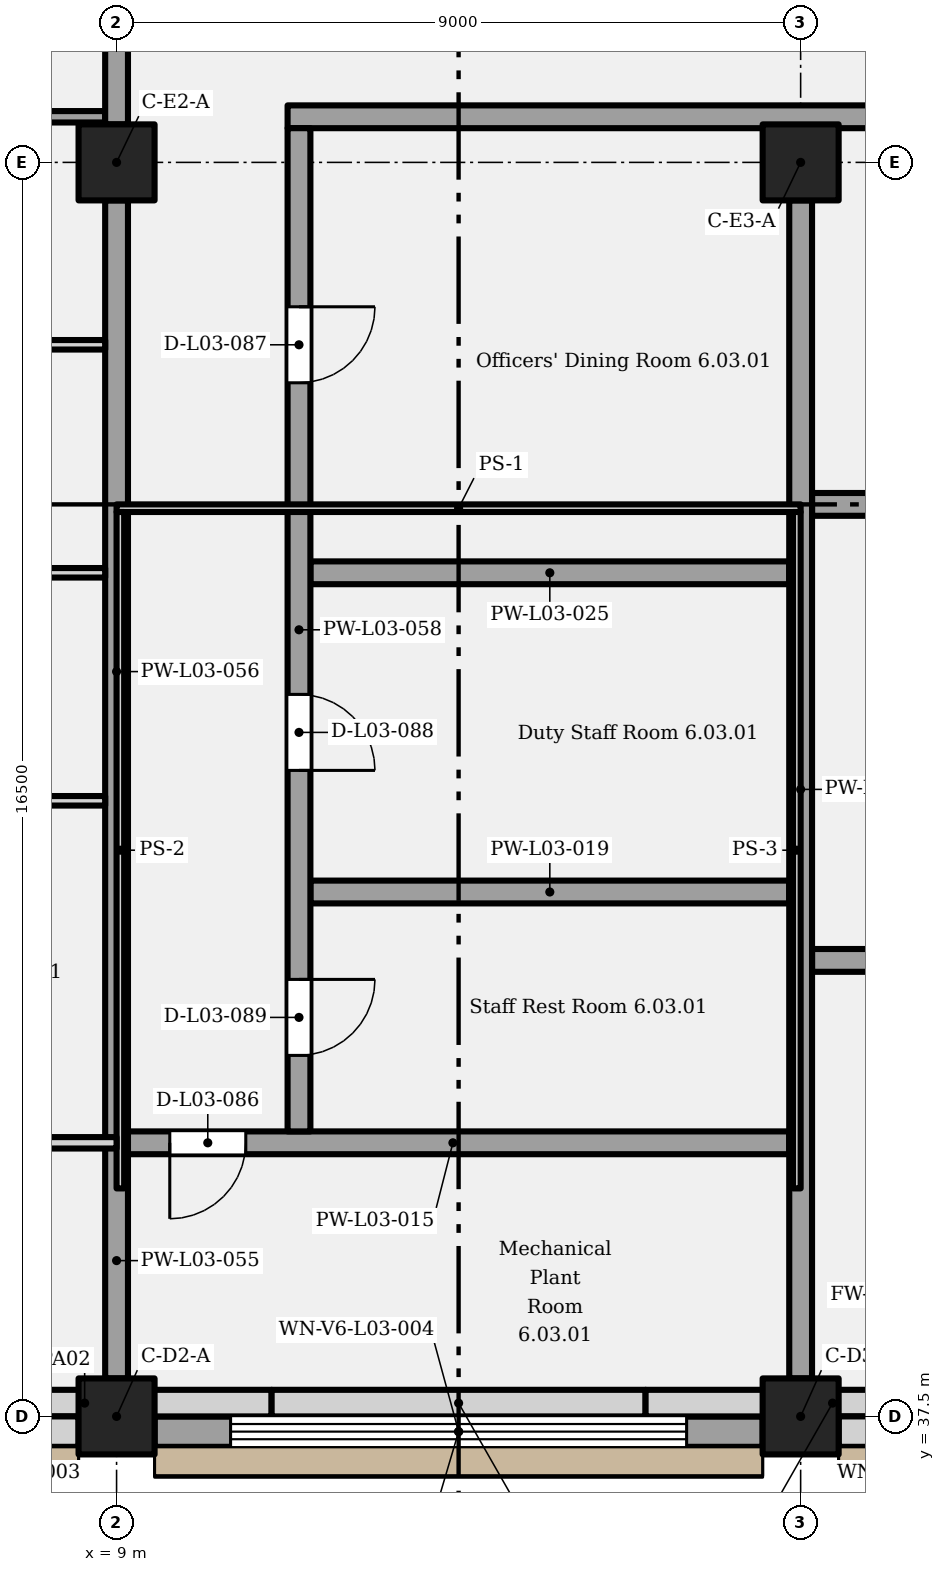
"""IFC4 building model, lengths in metres.
Left out: names, types, materials, properties, quantities, classifications, styles, units other than length and angle.
Written with IfcOpenShell. Run it as: python <this file> out.ifc"""

import sys

from ifc_helpers import new_model, si_unit, direction, frame, frame_2d, origin, origin_2d, place, context, subcontext, project, spatial, rectangle, extrude, element, fill, save


model = new_model("IFC4")
c1 = context("Model", 3, precision=1e-05, world=origin(), true_north=direction((0.0, 1.0)))
c2 = subcontext(c1, "Body", "Model", "MODEL_VIEW")
j1 = project(units=[si_unit("LENGTHUNIT", "METRE"), si_unit("PLANEANGLEUNIT", "RADIAN")], contexts=[c1])
p1 = place(None, origin())
s1 = spatial("IfcSite", under=j1, at=p1, CompositionType="ELEMENT")
p2 = place(p1, origin())
s2 = spatial("IfcBuilding", under=s1, at=p2, CompositionType="ELEMENT")
p3 = place(p2, frame((0.0, 0.0, 17.4)))
s3 = spatial("IfcBuildingStorey", under=s2, at=p3, CompositionType="ELEMENT", Elevation=17.4)
for number, where, z_axis, x_axis in (
    (1, (9.0, 37.5, 0.0), (0.0, 0.0, 1.0), (1.0, 0.0, 0.0)),
    (2, (18.0, 37.5, 0.0), (0.0, 0.0, 1.0), (1.0, 0.0, 0.0)),
    (3, (9.0, 54.0, 0.0), (0.0, 0.0, 1.0), (1.0, 0.0, 0.0)),
    (4, (18.0, 54.0, 0.0), (0.0, 0.0, 1.0), (1.0, 0.0, 0.0)),
):
    element("IfcColumn", number, at=place(p3, frame(where, z_axis=z_axis, x_axis=x_axis)), inside=s3, PredefinedType="COLUMN", context=c2, shape_type="SweptSolid", body=[
        extrude(rectangle(XDim=1.0, YDim=1.0, at=origin_2d()), origin(), (0.0, 0.0, 1.0), 5.4),
    ])
p4 = place(p3, frame((0.45, 37.3, 0.0), z_axis=(0.0, 0.0, 1.0), x_axis=(1.0, 0.0, 0.0)))
e5 = element("IfcWall", 5, at=p4, inside=s3, PredefinedType="SOLIDWALL", context=c2, shape_type="SweptSolid", body=[
    extrude(rectangle(XDim=8.05, YDim=0.4, at=frame_2d((4.025, 0.0))), origin(), (0.0, 0.0, 1.0), 5.15),
])
p5 = place(p4, frame((0.6, 0.0, 1.5)))
e6 = element("IfcOpeningElement", 6, at=p5, cuts=e5, PredefinedType="OPENING", context=c2, shape_type="SweptSolid", body=[
    extrude(rectangle(XDim=0.9, YDim=1.8, at=frame_2d((0.45, 0.9))), frame((0.0, 0.21, 0.0), z_axis=(0.0, -1.0, 0.0), x_axis=(1.0, 0.0, 0.0)), (0.0, 0.0, 1.0), 0.42),
])
p6 = place(p4, frame((3.6, 0.0, 1.5)))
e7 = element("IfcOpeningElement", 7, at=p6, cuts=e5, PredefinedType="OPENING", context=c2, shape_type="SweptSolid", body=[
    extrude(rectangle(XDim=0.9, YDim=1.8, at=frame_2d((0.45, 0.9))), frame((0.0, 0.21, 0.0), z_axis=(0.0, -1.0, 0.0), x_axis=(1.0, 0.0, 0.0)), (0.0, 0.0, 1.0), 0.42),
])
p7 = place(p4, frame((6.6, 0.0, 1.5)))
e8 = element("IfcOpeningElement", 8, at=p7, cuts=e5, PredefinedType="OPENING", context=c2, shape_type="SweptSolid", body=[
    extrude(rectangle(XDim=0.9, YDim=1.8, at=frame_2d((0.45, 0.9))), frame((0.0, 0.21, 0.0), z_axis=(0.0, -1.0, 0.0), x_axis=(1.0, 0.0, 0.0)), (0.0, 0.0, 1.0), 0.42),
])
p8 = place(p3, frame((9.5, 37.3, 0.0), z_axis=(0.0, 0.0, 1.0), x_axis=(1.0, 0.0, 0.0)))
e9 = element("IfcWall", 9, at=p8, inside=s3, PredefinedType="SOLIDWALL", context=c2, shape_type="SweptSolid", body=[
    extrude(rectangle(XDim=8.0, YDim=0.4, at=frame_2d((4.0, 0.0))), origin(), (0.0, 0.0, 1.0), 5.15),
])
p9 = place(p8, frame((1.0, 0.0, 0.9)))
e10 = element("IfcOpeningElement", 10, at=p9, cuts=e9, PredefinedType="OPENING", context=c2, shape_type="SweptSolid", body=[
    extrude(rectangle(XDim=6.0, YDim=3.3, at=frame_2d((3.0, 1.65))), frame((0.0, 0.21, 0.0), z_axis=(0.0, -1.0, 0.0), x_axis=(1.0, 0.0, 0.0)), (0.0, 0.0, 1.0), 0.42),
])
p10 = place(p3, frame((18.5, 37.3, 0.0), z_axis=(0.0, 0.0, 1.0), x_axis=(1.0, 0.0, 0.0)))
e11 = element("IfcWall", 11, at=p10, inside=s3, PredefinedType="SOLIDWALL", context=c2, shape_type="SweptSolid", body=[
    extrude(rectangle(XDim=8.0, YDim=0.4, at=frame_2d((4.0, 0.0))), origin(), (0.0, 0.0, 1.0), 5.15),
])
p11 = place(p10, frame((0.55, 0.0, 1.5)))
e12 = element("IfcOpeningElement", 12, at=p11, cuts=e11, PredefinedType="OPENING", context=c2, shape_type="SweptSolid", body=[
    extrude(rectangle(XDim=0.9, YDim=1.8, at=frame_2d((0.45, 0.9))), frame((0.0, 0.21, 0.0), z_axis=(0.0, -1.0, 0.0), x_axis=(1.0, 0.0, 0.0)), (0.0, 0.0, 1.0), 0.42),
])
p12 = place(p10, frame((3.55, 0.0, 1.5)))
e13 = element("IfcOpeningElement", 13, at=p12, cuts=e11, PredefinedType="OPENING", context=c2, shape_type="SweptSolid", body=[
    extrude(rectangle(XDim=0.9, YDim=1.8, at=frame_2d((0.45, 0.9))), frame((0.0, 0.21, 0.0), z_axis=(0.0, -1.0, 0.0), x_axis=(1.0, 0.0, 0.0)), (0.0, 0.0, 1.0), 0.42),
])
p13 = place(p10, frame((6.55, 0.0, 1.5)))
e14 = element("IfcOpeningElement", 14, at=p13, cuts=e11, PredefinedType="OPENING", context=c2, shape_type="SweptSolid", body=[
    extrude(rectangle(XDim=0.9, YDim=1.8, at=frame_2d((0.45, 0.9))), frame((0.0, 0.21, 0.0), z_axis=(0.0, -1.0, 0.0), x_axis=(1.0, 0.0, 0.0)), (0.0, 0.0, 1.0), 0.42),
])
p14 = place(p3, frame((6.12, 37.675, 5.4), z_axis=(0.0, 0.0, 1.0), x_axis=(1.0, 0.0, 0.0)))
e15 = element("IfcWall", 15, at=p14, inside=s3, PredefinedType="PARAPET", context=c2, shape_type="SweptSolid", body=[
    extrude(rectangle(XDim=4.92, YDim=0.35, at=frame_2d((2.46, 0.0))), origin(), (0.0, 0.0, 1.0), 1.5),
])
p15 = place(p3, frame((11.04, 37.675, 5.4), z_axis=(0.0, 0.0, 1.0), x_axis=(1.0, 0.0, 0.0)))
e16 = element("IfcWall", 16, at=p15, inside=s3, PredefinedType="PARAPET", context=c2, shape_type="SweptSolid", body=[
    extrude(rectangle(XDim=4.92, YDim=0.35, at=frame_2d((2.46, 0.0))), origin(), (0.0, 0.0, 1.0), 1.8),
])
p16 = place(p3, frame((15.96, 37.675, 5.4), z_axis=(0.0, 0.0, 1.0), x_axis=(1.0, 0.0, 0.0)))
e17 = element("IfcWall", 17, at=p16, inside=s3, PredefinedType="PARAPET", context=c2, shape_type="SweptSolid", body=[
    extrude(rectangle(XDim=4.92, YDim=0.35, at=frame_2d((2.46, 0.0))), origin(), (0.0, 0.0, 1.0), 1.5),
])
p17 = place(p3, frame((9.0, 49.45, 5.4), z_axis=(0.0, 0.0, 1.0), x_axis=(1.0, 0.0, 0.0)))
e18 = element("IfcWall", 18, at=p17, inside=s3, PredefinedType="SOLIDWALL", context=c2, shape_type="SweptSolid", body=[
    extrude(rectangle(XDim=9.0, YDim=0.1, at=frame_2d((4.5, 0.0))), origin(), (0.0, 0.0, 1.0), 2.4),
])
for number, where, z_axis, x_axis in (
    (19, (9.05, 40.5, 5.4), (0.0, 0.0, 1.0), (0.0, 1.0, 0.0)),
    (20, (17.95, 40.5, 5.4), (0.0, 0.0, 1.0), (0.0, 1.0, 0.0)),
):
    element("IfcWall", number, at=place(p3, frame(where, z_axis=z_axis, x_axis=x_axis)), inside=s3, PredefinedType="SOLIDWALL", context=c2, shape_type="SweptSolid", body=[
        extrude(rectangle(XDim=8.9, YDim=0.1, at=frame_2d((4.45, 0.0))), origin(), (0.0, 0.0, 1.0), 2.4),
    ])
p18 = place(p3, frame((2.4, 41.1, 0.0), z_axis=(0.0, 0.0, 1.0), x_axis=(1.0, 0.0, 0.0)))
e21 = element("IfcWall", 21, at=p18, inside=s3, PredefinedType="PARTITIONING", context=c2, shape_type="SweptSolid", body=[
    extrude(rectangle(XDim=6.6, YDim=0.15, at=frame_2d((3.3, 0.0))), origin(), (0.0, 0.0, 1.0), 5.15),
])
p19 = place(p3, frame((9.0, 41.1, 0.0), z_axis=(0.0, 0.0, 1.0), x_axis=(1.0, 0.0, 0.0)))
e22 = element("IfcWall", 22, at=p19, inside=s3, PredefinedType="PARTITIONING", context=c2, shape_type="SweptSolid", body=[
    extrude(rectangle(XDim=8.85, YDim=0.3, at=frame_2d((4.425, 0.0))), origin(), (0.0, 0.0, 1.0), 5.15),
])
p20 = place(p19, frame((1.7, 0.0, 0.0), z_axis=(0.0, 0.0, 1.0), x_axis=(-1.0, 0.0, 0.0)))
e23 = element("IfcOpeningElement", 23, at=p20, cuts=e22, PredefinedType="OPENING", context=c2, shape_type="SweptSolid", body=[
    extrude(rectangle(XDim=1.0, YDim=2.1, at=frame_2d((0.5, 1.05))), frame((0.0, 0.16, 0.0), z_axis=(0.0, -1.0, 0.0), x_axis=(1.0, 0.0, 0.0)), (0.0, 0.0, 1.0), 0.32),
])
p21 = place(p3, frame((18.15, 43.5, 0.0), z_axis=(0.0, 0.0, 1.0), x_axis=(1.0, 0.0, 0.0)))
e24 = element("IfcWall", 24, at=p21, inside=s3, PredefinedType="PARTITIONING", context=c2, shape_type="SweptSolid", body=[
    extrude(rectangle(XDim=8.85, YDim=0.3, at=frame_2d((4.425, 0.0))), origin(), (0.0, 0.0, 1.0), 5.15),
])
p22 = place(p21, frame((3.35, 0.0, 0.0), z_axis=(0.0, 0.0, 1.0), x_axis=(-1.0, 0.0, 0.0)))
e25 = element("IfcOpeningElement", 25, at=p22, cuts=e24, PredefinedType="OPENING", context=c2, shape_type="SweptSolid", body=[
    extrude(rectangle(XDim=1.0, YDim=2.1, at=frame_2d((0.5, 1.05))), frame((0.0, 0.16, 0.0), z_axis=(0.0, -1.0, 0.0), x_axis=(1.0, 0.0, 0.0)), (0.0, 0.0, 1.0), 0.32),
])
p23 = place(p3, frame((11.55, 44.4, 0.0), z_axis=(0.0, 0.0, 1.0), x_axis=(1.0, 0.0, 0.0)))
e26 = element("IfcWall", 26, at=p23, inside=s3, PredefinedType="PARTITIONING", context=c2, shape_type="SweptSolid", body=[
    extrude(rectangle(XDim=6.3, YDim=0.3, at=frame_2d((3.15, 0.0))), origin(), (0.0, 0.0, 1.0), 5.15),
])
for number, where, z_axis, x_axis in (
    (27, (2.475, 45.6, 0.0), (0.0, 0.0, 1.0), (1.0, 0.0, 0.0)),
    (28, (2.475, 48.6, 0.0), (0.0, 0.0, 1.0), (1.0, 0.0, 0.0)),
):
    element("IfcWall", number, at=place(p3, frame(where, z_axis=z_axis, x_axis=x_axis)), inside=s3, PredefinedType="PARTITIONING", context=c2, shape_type="SweptSolid", body=[
        extrude(rectangle(XDim=6.375, YDim=0.125, at=frame_2d((3.188, 0.0))), origin(), (0.0, 0.0, 1.0), 5.15),
    ])
p24 = place(p3, frame((11.55, 48.6, 0.0), z_axis=(0.0, 0.0, 1.0), x_axis=(1.0, 0.0, 0.0)))
e29 = element("IfcWall", 29, at=p24, inside=s3, PredefinedType="PARTITIONING", context=c2, shape_type="SweptSolid", body=[
    extrude(rectangle(XDim=6.3, YDim=0.3, at=frame_2d((3.15, 0.0))), origin(), (0.0, 0.0, 1.0), 5.15),
])
p25 = place(p3, frame((18.15, 49.5, 0.0), z_axis=(0.0, 0.0, 1.0), x_axis=(1.0, 0.0, 0.0)))
e30 = element("IfcWall", 30, at=p25, inside=s3, PredefinedType="PARTITIONING", context=c2, shape_type="SweptSolid", body=[
    extrude(rectangle(XDim=8.85, YDim=0.3, at=frame_2d((4.425, 0.0))), origin(), (0.0, 0.0, 1.0), 5.15),
])
p26 = place(p25, frame((3.35, 0.0, 0.0), z_axis=(0.0, 0.0, 1.0), x_axis=(-1.0, 0.0, 0.0)))
e31 = element("IfcOpeningElement", 31, at=p26, cuts=e30, PredefinedType="OPENING", context=c2, shape_type="SweptSolid", body=[
    extrude(rectangle(XDim=1.0, YDim=2.1, at=frame_2d((0.5, 1.05))), frame((0.0, 0.16, 0.0), z_axis=(0.0, -1.0, 0.0), x_axis=(1.0, 0.0, 0.0)), (0.0, 0.0, 1.0), 0.32),
])
p27 = place(p3, frame((2.475, 51.6, 0.0), z_axis=(0.0, 0.0, 1.0), x_axis=(1.0, 0.0, 0.0)))
e32 = element("IfcWall", 32, at=p27, inside=s3, PredefinedType="PARTITIONING", context=c2, shape_type="SweptSolid", body=[
    extrude(rectangle(XDim=6.375, YDim=0.125, at=frame_2d((3.188, 0.0))), origin(), (0.0, 0.0, 1.0), 5.15),
])
p28 = place(p3, frame((2.325, 54.6, 0.0), z_axis=(0.0, 0.0, 1.0), x_axis=(1.0, 0.0, 0.0)))
e33 = element("IfcWall", 33, at=p28, inside=s3, PredefinedType="PARTITIONING", context=c2, shape_type="SweptSolid", body=[
    extrude(rectangle(XDim=6.525, YDim=0.15, at=frame_2d((3.263, 0.0))), origin(), (0.0, 0.0, 1.0), 5.15),
])
p29 = place(p3, frame((11.25, 54.6, 0.0), z_axis=(0.0, 0.0, 1.0), x_axis=(1.0, 0.0, 0.0)))
e34 = element("IfcWall", 34, at=p29, inside=s3, PredefinedType="PARTITIONING", context=c2, shape_type="SweptSolid", body=[
    extrude(rectangle(XDim=15.75, YDim=0.3, at=frame_2d((7.875, 0.0))), origin(), (0.0, 0.0, 1.0), 5.15),
])
p30 = place(p29, frame((10.25, 0.0, 0.0), z_axis=(0.0, 0.0, 1.0), x_axis=(-1.0, 0.0, 0.0)))
e35 = element("IfcOpeningElement", 35, at=p30, cuts=e34, PredefinedType="OPENING", context=c2, shape_type="SweptSolid", body=[
    extrude(rectangle(XDim=1.0, YDim=2.1, at=frame_2d((0.5, 1.05))), frame((0.0, 0.16, 0.0), z_axis=(0.0, -1.0, 0.0), x_axis=(1.0, 0.0, 0.0)), (0.0, 0.0, 1.0), 0.32),
])
p31 = place(p3, frame((9.0, 38.0, 0.0), z_axis=(0.0, 0.0, 1.0), x_axis=(0.0, 1.0, 0.0)))
e36 = element("IfcWall", 36, at=p31, inside=s3, PredefinedType="PARTITIONING", context=c2, shape_type="SweptSolid", body=[
    extrude(rectangle(XDim=3.1, YDim=0.3, at=frame_2d((1.55, 0.0))), origin(), (0.0, 0.0, 1.0), 4.2),
])
p32 = place(p3, frame((9.0, 41.1, 0.0), z_axis=(0.0, 0.0, 1.0), x_axis=(0.0, 1.0, 0.0)))
e37 = element("IfcWall", 37, at=p32, inside=s3, PredefinedType="PARTITIONING", context=c2, shape_type="SweptSolid", body=[
    extrude(rectangle(XDim=12.4, YDim=0.3, at=frame_2d((6.2, 0.0))), origin(), (0.0, 0.0, 1.0), 4.2),
])
p33 = place(p3, frame((9.0, 54.5, 0.0), z_axis=(0.0, 0.0, 1.0), x_axis=(0.0, 1.0, 0.0)))
e38 = element("IfcWall", 38, at=p33, inside=s3, PredefinedType="PARTITIONING", context=c2, shape_type="SweptSolid", body=[
    extrude(rectangle(XDim=2.5, YDim=0.3, at=frame_2d((1.25, 0.0))), origin(), (0.0, 0.0, 1.0), 4.4),
])
p34 = place(p3, frame((11.4, 41.25, 0.0), z_axis=(0.0, 0.0, 1.0), x_axis=(0.0, 1.0, 0.0)))
e39 = element("IfcWall", 39, at=p34, inside=s3, PredefinedType="PARTITIONING", context=c2, shape_type="SweptSolid", body=[
    extrude(rectangle(XDim=13.2, YDim=0.3, at=frame_2d((6.6, 0.0))), origin(), (0.0, 0.0, 1.0), 5.15),
])
p35 = place(p34, frame((10.85, 0.0, 0.0), z_axis=(0.0, 0.0, 1.0), x_axis=(-1.0, 0.0, 0.0)))
e40 = element("IfcOpeningElement", 40, at=p35, cuts=e39, PredefinedType="OPENING", context=c2, shape_type="SweptSolid", body=[
    extrude(rectangle(XDim=1.0, YDim=2.1, at=frame_2d((0.5, 1.05))), frame((0.0, 0.16, 0.0), z_axis=(0.0, -1.0, 0.0), x_axis=(1.0, 0.0, 0.0)), (0.0, 0.0, 1.0), 0.32),
])
p36 = place(p34, frame((5.75, 0.0, 0.0), z_axis=(0.0, 0.0, 1.0), x_axis=(-1.0, 0.0, 0.0)))
e41 = element("IfcOpeningElement", 41, at=p36, cuts=e39, PredefinedType="OPENING", context=c2, shape_type="SweptSolid", body=[
    extrude(rectangle(XDim=1.0, YDim=2.1, at=frame_2d((0.5, 1.05))), frame((0.0, 0.16, 0.0), z_axis=(0.0, -1.0, 0.0), x_axis=(1.0, 0.0, 0.0)), (0.0, 0.0, 1.0), 0.32),
])
p37 = place(p34, frame((2.0, 0.0, 0.0), z_axis=(0.0, 0.0, 1.0), x_axis=(-1.0, 0.0, 0.0)))
e42 = element("IfcOpeningElement", 42, at=p37, cuts=e39, PredefinedType="OPENING", context=c2, shape_type="SweptSolid", body=[
    extrude(rectangle(XDim=1.0, YDim=2.1, at=frame_2d((0.5, 1.05))), frame((0.0, 0.16, 0.0), z_axis=(0.0, -1.0, 0.0), x_axis=(1.0, 0.0, 0.0)), (0.0, 0.0, 1.0), 0.32),
])
p38 = place(p3, frame((18.0, 38.0, 0.0), z_axis=(0.0, 0.0, 1.0), x_axis=(0.0, 1.0, 0.0)))
e43 = element("IfcWall", 43, at=p38, inside=s3, PredefinedType="PARTITIONING", context=c2, shape_type="SweptSolid", body=[
    extrude(rectangle(XDim=15.5, YDim=0.3, at=frame_2d((7.75, 0.0))), origin(), (0.0, 0.0, 1.0), 4.2),
])
p39 = place(p9, origin())
e44 = element("IfcWindow", 44, at=p39, inside=s3, PartitioningType="SINGLE_PANEL", PredefinedType="WINDOW", context=c2, shape_type="SweptSolid", body=[
    extrude(rectangle(XDim=6.0, YDim=3.3, at=frame_2d((3.0, 1.65))), frame((0.0, 0.03, 0.0), z_axis=(0.0, -1.0, 0.0), x_axis=(1.0, 0.0, 0.0)), (0.0, 0.0, 1.0), 0.06),
])
fill(e10, e44)
p40 = place(p20, origin())
e45 = element("IfcDoor", 45, at=p40, inside=s3, OperationType="SINGLE_SWING_RIGHT", PredefinedType="DOOR", context=c2, shape_type="SweptSolid", body=[
    extrude(rectangle(XDim=1.0, YDim=2.1, at=frame_2d((0.5, 1.05))), frame((0.0, 0.025, 0.0), z_axis=(0.0, -1.0, 0.0), x_axis=(1.0, 0.0, 0.0)), (0.0, 0.0, 1.0), 0.05),
])
fill(e23, e45)
p41 = place(p35, origin())
e46 = element("IfcDoor", 46, at=p41, inside=s3, OperationType="SINGLE_SWING_LEFT", PredefinedType="DOOR", context=c2, shape_type="SweptSolid", body=[
    extrude(rectangle(XDim=1.0, YDim=2.1, at=frame_2d((0.5, 1.05))), frame((0.0, 0.025, 0.0), z_axis=(0.0, -1.0, 0.0), x_axis=(1.0, 0.0, 0.0)), (0.0, 0.0, 1.0), 0.05),
])
fill(e40, e46)
p42 = place(p36, origin())
e47 = element("IfcDoor", 47, at=p42, inside=s3, OperationType="SINGLE_SWING_RIGHT", PredefinedType="DOOR", context=c2, shape_type="SweptSolid", body=[
    extrude(rectangle(XDim=1.0, YDim=2.1, at=frame_2d((0.5, 1.05))), frame((0.0, 0.025, 0.0), z_axis=(0.0, -1.0, 0.0), x_axis=(1.0, 0.0, 0.0)), (0.0, 0.0, 1.0), 0.05),
])
fill(e41, e47)
p43 = place(p37, origin())
e48 = element("IfcDoor", 48, at=p43, inside=s3, OperationType="SINGLE_SWING_LEFT", PredefinedType="DOOR", context=c2, shape_type="SweptSolid", body=[
    extrude(rectangle(XDim=1.0, YDim=2.1, at=frame_2d((0.5, 1.05))), frame((0.0, 0.025, 0.0), z_axis=(0.0, -1.0, 0.0), x_axis=(1.0, 0.0, 0.0)), (0.0, 0.0, 1.0), 0.05),
])
fill(e42, e48)
save(model, sys.argv[1])
